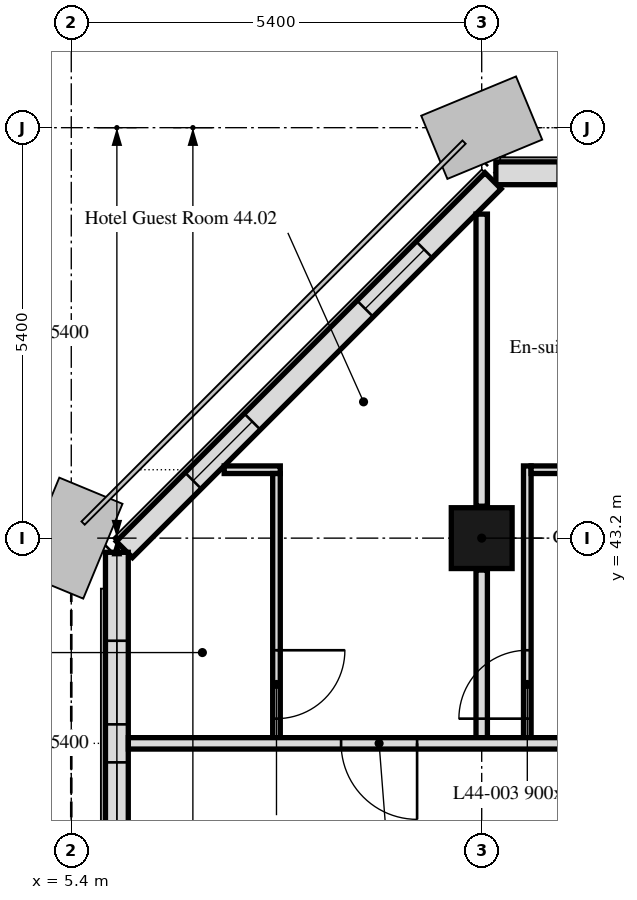
"""IFC4 building model, lengths in metres.
Left out: names, types, materials, properties, quantities, classifications, styles, units other than length and angle.
Written with IfcOpenShell. Run it as: python <this file> out.ifc"""

import sys

from ifc_helpers import new_model, si_unit, direction, frame, frame_2d, origin, origin_2d, place, context, subcontext, project, spatial, rectangle, extrude, element, fill, save


model = new_model("IFC4")
c1 = context("Model", 3, precision=1e-05, world=origin(), true_north=direction((0.0, 1.0)))
c2 = subcontext(c1, "Body", "Model", "MODEL_VIEW")
j1 = project(units=[si_unit("LENGTHUNIT", "METRE"), si_unit("PLANEANGLEUNIT", "RADIAN")], contexts=[c1])
p1 = place(None, origin())
s1 = spatial("IfcSite", under=j1, at=p1, CompositionType="ELEMENT")
p2 = place(p1, origin())
s2 = spatial("IfcBuilding", under=s1, at=p2, CompositionType="ELEMENT")
p3 = place(p2, frame((0.0, 0.0, 184.0)))
s3 = spatial("IfcBuildingStorey", under=s2, at=p3, CompositionType="ELEMENT", Elevation=184.0)
p4 = place(p3, frame((10.8, 43.2, 0.0), z_axis=(0.0, 0.0, 1.0), x_axis=(1.0, 0.0, 0.0)))
e1 = element("IfcColumn", 1, at=p4, inside=s3, PredefinedType="COLUMN", context=c2, shape_type="SweptSolid", body=[
    extrude(rectangle(XDim=0.8, YDim=0.8, at=origin_2d()), origin(), (0.0, 0.0, 1.0), 3.0),
])
p5 = place(p3, frame((43.014, 48.0, 0.0), z_axis=(0.0, 0.0, 1.0), x_axis=(-1.0, 0.0, 0.0)))
e2 = element("IfcWall", 2, at=p5, inside=s3, PredefinedType="SOLIDWALL", context=c2, shape_type="SweptSolid", body=[
    extrude(rectangle(XDim=32.027, YDim=0.3, at=frame_2d((16.014, 0.0))), origin(), (0.0, 0.0, 1.0), 3.0),
])
p6 = place(p5, frame((2.764, 0.0, 0.9)))
e3 = element("IfcOpeningElement", 3, at=p6, cuts=e2, PredefinedType="OPENING", context=c2, shape_type="SweptSolid", body=[
    extrude(rectangle(XDim=1.1, YDim=1.7, at=frame_2d((0.55, 0.85))), frame((0.0, 0.16, 0.0), z_axis=(0.0, -1.0, 0.0), x_axis=(1.0, 0.0, 0.0)), (0.0, 0.0, 1.0), 0.32),
])
p7 = place(p5, frame((6.214, 0.0, 0.9)))
e4 = element("IfcOpeningElement", 4, at=p7, cuts=e2, PredefinedType="OPENING", context=c2, shape_type="SweptSolid", body=[
    extrude(rectangle(XDim=3.4, YDim=1.7, at=frame_2d((1.7, 0.85))), frame((0.0, 0.16, 0.0), z_axis=(0.0, -1.0, 0.0), x_axis=(1.0, 0.0, 0.0)), (0.0, 0.0, 1.0), 0.32),
])
p8 = place(p5, frame((13.564, 0.0, 0.9)))
e5 = element("IfcOpeningElement", 5, at=p8, cuts=e2, PredefinedType="OPENING", context=c2, shape_type="SweptSolid", body=[
    extrude(rectangle(XDim=1.1, YDim=1.7, at=frame_2d((0.55, 0.85))), frame((0.0, 0.16, 0.0), z_axis=(0.0, -1.0, 0.0), x_axis=(1.0, 0.0, 0.0)), (0.0, 0.0, 1.0), 0.32),
])
p9 = place(p5, frame((17.014, 0.0, 0.9)))
e6 = element("IfcOpeningElement", 6, at=p9, cuts=e2, PredefinedType="OPENING", context=c2, shape_type="SweptSolid", body=[
    extrude(rectangle(XDim=3.4, YDim=1.7, at=frame_2d((1.7, 0.85))), frame((0.0, 0.16, 0.0), z_axis=(0.0, -1.0, 0.0), x_axis=(1.0, 0.0, 0.0)), (0.0, 0.0, 1.0), 0.32),
])
p10 = place(p5, frame((24.364, 0.0, 0.9)))
e7 = element("IfcOpeningElement", 7, at=p10, cuts=e2, PredefinedType="OPENING", context=c2, shape_type="SweptSolid", body=[
    extrude(rectangle(XDim=1.1, YDim=1.7, at=frame_2d((0.55, 0.85))), frame((0.0, 0.16, 0.0), z_axis=(0.0, -1.0, 0.0), x_axis=(1.0, 0.0, 0.0)), (0.0, 0.0, 1.0), 0.32),
])
p11 = place(p5, frame((27.814, 0.0, 0.9)))
e8 = element("IfcOpeningElement", 8, at=p11, cuts=e2, PredefinedType="OPENING", context=c2, shape_type="SweptSolid", body=[
    extrude(rectangle(XDim=3.4, YDim=1.7, at=frame_2d((1.7, 0.85))), frame((0.0, 0.16, 0.0), z_axis=(0.0, -1.0, 0.0), x_axis=(1.0, 0.0, 0.0)), (0.0, 0.0, 1.0), 0.32),
])
p12 = place(p3, frame((10.949, 47.901, 0.0), z_axis=(0.0, 0.0, 1.0), x_axis=(-0.707106781187, -0.707106781187, 0.0)))
e9 = element("IfcWall", 9, at=p12, inside=s3, PredefinedType="SOLIDWALL", context=c2, shape_type="SweptSolid", body=[
    extrude(rectangle(XDim=6.86, YDim=0.3, at=frame_2d((3.43, 0.0))), origin(), (0.0, 0.0, 1.0), 3.0),
])
p13 = place(p12, frame((1.28, 0.0, 0.9)))
e10 = element("IfcOpeningElement", 10, at=p13, cuts=e9, PredefinedType="OPENING", context=c2, shape_type="SweptSolid", body=[
    extrude(rectangle(XDim=1.1, YDim=1.7, at=frame_2d((0.55, 0.85))), frame((0.0, 0.16, 0.0), z_axis=(0.0, -1.0, 0.0), x_axis=(1.0, 0.0, 0.0)), (0.0, 0.0, 1.0), 0.32),
])
p14 = place(p12, frame((4.48, 0.0, 0.9)))
e11 = element("IfcOpeningElement", 11, at=p14, cuts=e9, PredefinedType="OPENING", context=c2, shape_type="SweptSolid", body=[
    extrude(rectangle(XDim=1.1, YDim=1.7, at=frame_2d((0.55, 0.85))), frame((0.0, 0.16, 0.0), z_axis=(0.0, -1.0, 0.0), x_axis=(1.0, 0.0, 0.0)), (0.0, 0.0, 1.0), 0.32),
])
p15 = place(p3, frame((6.0, 43.014, 0.0), z_axis=(0.0, 0.0, 1.0), x_axis=(0.0, -1.0, 0.0)))
e12 = element("IfcWall", 12, at=p15, inside=s3, PredefinedType="SOLIDWALL", context=c2, shape_type="SweptSolid", body=[
    extrude(rectangle(XDim=10.614, YDim=0.3, at=frame_2d((5.307, 0.0))), origin(), (0.0, 0.0, 1.0), 3.0),
])
p16 = place(p15, frame((1.164, 0.0, 0.9)))
e13 = element("IfcOpeningElement", 13, at=p16, cuts=e12, PredefinedType="OPENING", context=c2, shape_type="SweptSolid", body=[
    extrude(rectangle(XDim=1.1, YDim=1.7, at=frame_2d((0.55, 0.85))), frame((0.0, 0.16, 0.0), z_axis=(0.0, -1.0, 0.0), x_axis=(1.0, 0.0, 0.0)), (0.0, 0.0, 1.0), 0.32),
])
p17 = place(p15, frame((2.764, 0.0, 0.9)))
e14 = element("IfcOpeningElement", 14, at=p17, cuts=e12, PredefinedType="OPENING", context=c2, shape_type="SweptSolid", body=[
    extrude(rectangle(XDim=1.1, YDim=1.7, at=frame_2d((0.55, 0.85))), frame((0.0, 0.16, 0.0), z_axis=(0.0, -1.0, 0.0), x_axis=(1.0, 0.0, 0.0)), (0.0, 0.0, 1.0), 0.32),
])
p18 = place(p15, frame((6.214, 0.0, 0.9)))
e15 = element("IfcOpeningElement", 15, at=p18, cuts=e12, PredefinedType="OPENING", context=c2, shape_type="SweptSolid", body=[
    extrude(rectangle(XDim=3.4, YDim=1.7, at=frame_2d((1.7, 0.85))), frame((0.0, 0.16, 0.0), z_axis=(0.0, -1.0, 0.0), x_axis=(1.0, 0.0, 0.0)), (0.0, 0.0, 1.0), 0.32),
])
p19 = place(p3, frame((7.412, 44.1, 0.0), z_axis=(0.0, 0.0, 1.0), x_axis=(1.0, 0.0, 0.0)))
e16 = element("IfcWall", 16, at=p19, inside=s3, PredefinedType="PARTITIONING", context=c2, shape_type="SweptSolid", body=[
    extrude(rectangle(XDim=0.738, YDim=0.1, at=frame_2d((0.369, 0.0))), origin(), (0.0, 0.0, 1.0), 3.0),
])
p20 = place(p3, frame((8.1, 44.05, 0.0), z_axis=(0.0, 0.0, 1.0), x_axis=(0.0, -1.0, 0.0)))
e17 = element("IfcWall", 17, at=p20, inside=s3, PredefinedType="PARTITIONING", context=c2, shape_type="SweptSolid", body=[
    extrude(rectangle(XDim=3.475, YDim=0.1, at=frame_2d((1.738, 0.0))), origin(), (0.0, 0.0, 1.0), 3.0),
])
p21 = place(p20, frame((2.325, 0.0, 0.0)))
e18 = element("IfcOpeningElement", 18, at=p21, cuts=e17, PredefinedType="OPENING", context=c2, shape_type="SweptSolid", body=[
    extrude(rectangle(XDim=0.9, YDim=2.1, at=frame_2d((0.45, 1.05))), frame((0.0, 0.05, 0.0), z_axis=(0.0, -1.0, 0.0), x_axis=(1.0, 0.0, 0.0)), (0.0, 0.0, 1.0), 0.1),
])
p22 = place(p3, frame((10.8, 40.575, 0.0), z_axis=(0.0, 0.0, 1.0), x_axis=(0.0, 1.0, 0.0)))
e19 = element("IfcWall", 19, at=p22, inside=s3, PredefinedType="PARTITIONING", context=c2, shape_type="SweptSolid", body=[
    extrude(rectangle(XDim=2.205, YDim=0.15, at=frame_2d((1.103, 0.0))), origin(), (0.0, 0.0, 1.0), 3.0),
])
p23 = place(p3, frame((10.8, 43.62, 0.0), z_axis=(0.0, 0.0, 1.0), x_axis=(0.0, 1.0, 0.0)))
e20 = element("IfcWall", 20, at=p23, inside=s3, PredefinedType="PARTITIONING", context=c2, shape_type="SweptSolid", body=[
    extrude(rectangle(XDim=3.843, YDim=0.15, at=frame_2d((1.921, 0.0))), origin(), (0.0, 0.0, 1.0), 3.0),
])
p24 = place(p3, frame((11.4, 40.575, 0.0), z_axis=(0.0, 0.0, 1.0), x_axis=(0.0, 1.0, 0.0)))
e21 = element("IfcWall", 21, at=p24, inside=s3, PredefinedType="PARTITIONING", context=c2, shape_type="SweptSolid", body=[
    extrude(rectangle(XDim=3.575, YDim=0.1, at=frame_2d((1.788, 0.0))), origin(), (0.0, 0.0, 1.0), 3.0),
])
p25 = place(p24, frame((0.25, 0.0, 0.0)))
e22 = element("IfcOpeningElement", 22, at=p25, cuts=e21, PredefinedType="OPENING", context=c2, shape_type="SweptSolid", body=[
    extrude(rectangle(XDim=0.9, YDim=2.1, at=frame_2d((0.45, 1.05))), frame((0.0, 0.05, 0.0), z_axis=(0.0, -1.0, 0.0), x_axis=(1.0, 0.0, 0.0)), (0.0, 0.0, 1.0), 0.1),
])
p26 = place(p3, frame((11.45, 44.1, 0.0), z_axis=(0.0, 0.0, 1.0), x_axis=(1.0, 0.0, 0.0)))
e23 = element("IfcWall", 23, at=p26, inside=s3, PredefinedType="PARTITIONING", context=c2, shape_type="SweptSolid", body=[
    extrude(rectangle(XDim=2.1, YDim=0.1, at=frame_2d((1.05, 0.0))), origin(), (0.0, 0.0, 1.0), 3.0),
])
p27 = place(p3, frame((47.849, 40.5, 0.0), z_axis=(0.0, 0.0, 1.0), x_axis=(-1.0, 0.0, 0.0)))
e24 = element("IfcWall", 24, at=p27, inside=s3, PredefinedType="PARTITIONING", context=c2, shape_type="SweptSolid", body=[
    extrude(rectangle(XDim=41.698, YDim=0.15, at=frame_2d((20.849, 0.0))), origin(), (0.0, 0.0, 1.0), 2.4),
])
p28 = place(p27, frame((37.899, 0.0, 0.0)))
e25 = element("IfcOpeningElement", 25, at=p28, cuts=e24, PredefinedType="OPENING", context=c2, shape_type="SweptSolid", body=[
    extrude(rectangle(XDim=1.0, YDim=2.1, at=frame_2d((0.5, 1.05))), frame((0.0, 0.075, 0.0), z_axis=(0.0, -1.0, 0.0), x_axis=(1.0, 0.0, 0.0)), (0.0, 0.0, 1.0), 0.15),
])
p29 = place(p27, frame((32.499, 0.0, 0.0)))
e26 = element("IfcOpeningElement", 26, at=p29, cuts=e24, PredefinedType="OPENING", context=c2, shape_type="SweptSolid", body=[
    extrude(rectangle(XDim=1.0, YDim=2.1, at=frame_2d((0.5, 1.05))), frame((0.0, 0.075, 0.0), z_axis=(0.0, -1.0, 0.0), x_axis=(1.0, 0.0, 0.0)), (0.0, 0.0, 1.0), 0.15),
])
p30 = place(p27, frame((27.099, 0.0, 0.0)))
e27 = element("IfcOpeningElement", 27, at=p30, cuts=e24, PredefinedType="OPENING", context=c2, shape_type="SweptSolid", body=[
    extrude(rectangle(XDim=1.0, YDim=2.1, at=frame_2d((0.5, 1.05))), frame((0.0, 0.075, 0.0), z_axis=(0.0, -1.0, 0.0), x_axis=(1.0, 0.0, 0.0)), (0.0, 0.0, 1.0), 0.15),
])
p31 = place(p27, frame((21.699, 0.0, 0.0)))
e28 = element("IfcOpeningElement", 28, at=p31, cuts=e24, PredefinedType="OPENING", context=c2, shape_type="SweptSolid", body=[
    extrude(rectangle(XDim=1.0, YDim=2.1, at=frame_2d((0.5, 1.05))), frame((0.0, 0.075, 0.0), z_axis=(0.0, -1.0, 0.0), x_axis=(1.0, 0.0, 0.0)), (0.0, 0.0, 1.0), 0.15),
])
p32 = place(p27, frame((16.299, 0.0, 0.0)))
e29 = element("IfcOpeningElement", 29, at=p32, cuts=e24, PredefinedType="OPENING", context=c2, shape_type="SweptSolid", body=[
    extrude(rectangle(XDim=1.0, YDim=2.1, at=frame_2d((0.5, 1.05))), frame((0.0, 0.075, 0.0), z_axis=(0.0, -1.0, 0.0), x_axis=(1.0, 0.0, 0.0)), (0.0, 0.0, 1.0), 0.15),
])
p33 = place(p27, frame((10.899, 0.0, 0.0)))
e30 = element("IfcOpeningElement", 30, at=p33, cuts=e24, PredefinedType="OPENING", context=c2, shape_type="SweptSolid", body=[
    extrude(rectangle(XDim=1.0, YDim=2.1, at=frame_2d((0.5, 1.05))), frame((0.0, 0.075, 0.0), z_axis=(0.0, -1.0, 0.0), x_axis=(1.0, 0.0, 0.0)), (0.0, 0.0, 1.0), 0.15),
])
p34 = place(p27, frame((2.849, 0.0, 0.0)))
e31 = element("IfcOpeningElement", 31, at=p34, cuts=e24, PredefinedType="OPENING", context=c2, shape_type="SweptSolid", body=[
    extrude(rectangle(XDim=1.0, YDim=2.1, at=frame_2d((0.5, 1.05))), frame((0.0, 0.075, 0.0), z_axis=(0.0, -1.0, 0.0), x_axis=(1.0, 0.0, 0.0)), (0.0, 0.0, 1.0), 0.15),
])
p35 = place(p13, origin())
e32 = element("IfcWindow", 32, at=p35, inside=s3, PartitioningType="SINGLE_PANEL", PredefinedType="WINDOW", context=c2, shape_type="SweptSolid", body=[
    extrude(rectangle(XDim=1.1, YDim=1.7, at=frame_2d((0.55, 0.85))), frame((0.0, 0.03, 0.0), z_axis=(0.0, -1.0, 0.0), x_axis=(1.0, 0.0, 0.0)), (0.0, 0.0, 1.0), 0.06),
])
fill(e10, e32)
p36 = place(p14, origin())
e33 = element("IfcWindow", 33, at=p36, inside=s3, PartitioningType="SINGLE_PANEL", PredefinedType="WINDOW", context=c2, shape_type="SweptSolid", body=[
    extrude(rectangle(XDim=1.1, YDim=1.7, at=frame_2d((0.55, 0.85))), frame((0.0, 0.03, 0.0), z_axis=(0.0, -1.0, 0.0), x_axis=(1.0, 0.0, 0.0)), (0.0, 0.0, 1.0), 0.06),
])
fill(e11, e33)
p37 = place(p16, origin())
e34 = element("IfcWindow", 34, at=p37, inside=s3, PartitioningType="SINGLE_PANEL", PredefinedType="WINDOW", context=c2, shape_type="SweptSolid", body=[
    extrude(rectangle(XDim=1.1, YDim=1.7, at=frame_2d((0.55, 0.85))), frame((0.0, 0.03, 0.0), z_axis=(0.0, -1.0, 0.0), x_axis=(1.0, 0.0, 0.0)), (0.0, 0.0, 1.0), 0.06),
])
fill(e13, e34)
p38 = place(p17, origin())
e35 = element("IfcWindow", 35, at=p38, inside=s3, PartitioningType="SINGLE_PANEL", PredefinedType="WINDOW", context=c2, shape_type="SweptSolid", body=[
    extrude(rectangle(XDim=1.1, YDim=1.7, at=frame_2d((0.55, 0.85))), frame((0.0, 0.03, 0.0), z_axis=(0.0, -1.0, 0.0), x_axis=(1.0, 0.0, 0.0)), (0.0, 0.0, 1.0), 0.06),
])
fill(e14, e35)
p39 = place(p21, origin())
e36 = element("IfcDoor", 36, at=p39, inside=s3, OperationType="SINGLE_SWING_LEFT", PredefinedType="DOOR", context=c2, shape_type="SweptSolid", body=[
    extrude(rectangle(XDim=0.9, YDim=2.1, at=frame_2d((0.45, 1.05))), frame((0.0, 0.025, 0.0), z_axis=(0.0, -1.0, 0.0), x_axis=(1.0, 0.0, 0.0)), (0.0, 0.0, 1.0), 0.05),
])
fill(e18, e36)
p40 = place(p25, origin())
e37 = element("IfcDoor", 37, at=p40, inside=s3, OperationType="SINGLE_SWING_LEFT", PredefinedType="DOOR", context=c2, shape_type="SweptSolid", body=[
    extrude(rectangle(XDim=0.9, YDim=2.1, at=frame_2d((0.45, 1.05))), frame((0.0, 0.025, 0.0), z_axis=(0.0, -1.0, 0.0), x_axis=(1.0, 0.0, 0.0)), (0.0, 0.0, 1.0), 0.05),
])
fill(e22, e37)
p41 = place(p28, origin())
e38 = element("IfcDoor", 38, at=p41, inside=s3, OperationType="SINGLE_SWING_LEFT", PredefinedType="DOOR", context=c2, shape_type="SweptSolid", body=[
    extrude(rectangle(XDim=1.0, YDim=2.1, at=frame_2d((0.5, 1.05))), frame((0.0, 0.025, 0.0), z_axis=(0.0, -1.0, 0.0), x_axis=(1.0, 0.0, 0.0)), (0.0, 0.0, 1.0), 0.05),
])
fill(e25, e38)
save(model, sys.argv[1])
